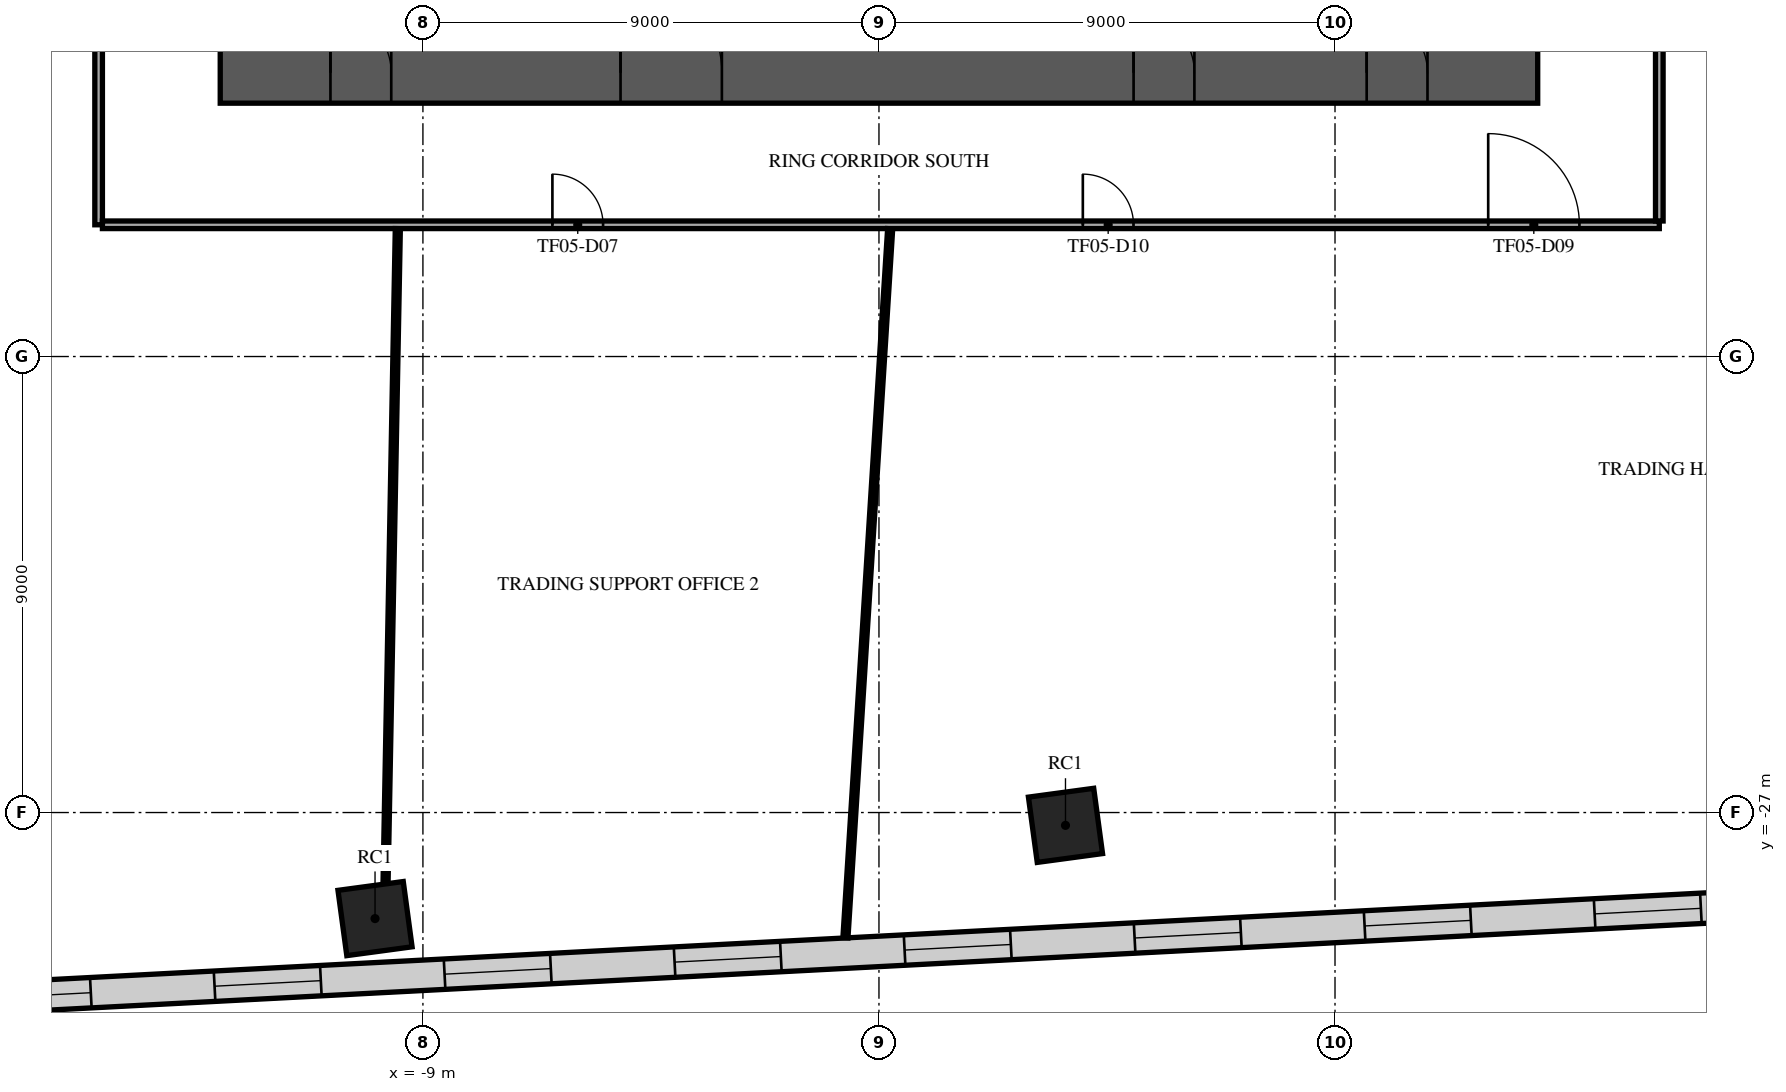
"""IFC4 building model, lengths in metres.
Left out: names, types, materials, properties, quantities, classifications, styles, units other than length and angle.
Written with IfcOpenShell. Run it as: python <this file> out.ifc"""

import sys

from ifc_helpers import new_model, si_unit, direction, frame, frame_2d, origin, origin_2d, place, context, subcontext, project, spatial, rectangle, extrude, element, fill, save


model = new_model("IFC4")
c1 = context("Model", 3, precision=1e-05, world=origin(), true_north=direction((0.0, 1.0)))
c2 = subcontext(c1, "Body", "Model", "MODEL_VIEW")
j1 = project(units=[si_unit("LENGTHUNIT", "METRE"), si_unit("PLANEANGLEUNIT", "RADIAN")], contexts=[c1])
p1 = place(None, origin())
s1 = spatial("IfcSite", under=j1, at=p1, CompositionType="ELEMENT")
p2 = place(p1, origin())
s2 = spatial("IfcBuilding", under=s1, at=p2, CompositionType="ELEMENT")
p3 = place(p2, frame((0.0, 0.0, 27.3)))
s3 = spatial("IfcBuildingStorey", under=s2, at=p3, CompositionType="ELEMENT", Elevation=27.3)
for number, where, z_axis, x_axis in (
    (1, (-9.945, -29.093, 0.0), (0.0, 0.0, 1.0), (0.991, 0.134, 0.0)),
    (2, (3.681, -27.253, 0.0), (0.0, 0.0, 1.0), (0.991, 0.134, 0.0)),
):
    element("IfcColumn", number, at=place(p3, frame(where, z_axis=z_axis, x_axis=x_axis)), inside=s3, PredefinedType="COLUMN", context=c2, shape_type="SweptSolid", body=[
        extrude(rectangle(XDim=1.3, YDim=1.3, at=origin_2d()), origin(), (0.0, 0.0, 1.0), 4.8),
    ])
p4 = place(p3, frame((-13.0, -12.4, 0.0), z_axis=(0.0, 0.0, 1.0), x_axis=(1.0, 0.0, 0.0)))
e3 = element("IfcWall", 3, at=p4, inside=s3, PredefinedType="SHEAR", context=c2, shape_type="SweptSolid", body=[
    extrude(rectangle(XDim=26.0, YDim=1.2, at=frame_2d((13.0, 0.0))), origin(), (0.0, 0.0, 1.0), 4.35),
])
p5 = place(p4, frame((7.9, 0.0, 0.0)))
e4 = element("IfcOpeningElement", 4, at=p5, cuts=e3, PredefinedType="OPENING", context=c2, shape_type="SweptSolid", body=[
    extrude(rectangle(XDim=2.0, YDim=2.1, at=frame_2d((1.0, 1.05))), frame((0.0, 0.61, 0.0), z_axis=(0.0, -1.0, 0.0), x_axis=(1.0, 0.0, 0.0)), (0.0, 0.0, 1.0), 1.22),
])
p6 = place(p4, frame((18.025, 0.0, 0.0)))
e5 = element("IfcOpeningElement", 5, at=p6, cuts=e3, PredefinedType="OPENING", context=c2, shape_type="SweptSolid", body=[
    extrude(rectangle(XDim=1.2, YDim=2.1, at=frame_2d((0.6, 1.05))), frame((0.0, 0.61, 0.0), z_axis=(0.0, -1.0, 0.0), x_axis=(1.0, 0.0, 0.0)), (0.0, 0.0, 1.0), 1.22),
])
p7 = place(p4, frame((2.175, 0.0, 0.0)))
e6 = element("IfcOpeningElement", 6, at=p7, cuts=e3, PredefinedType="OPENING", context=c2, shape_type="SweptSolid", body=[
    extrude(rectangle(XDim=1.2, YDim=2.1, at=frame_2d((0.6, 1.05))), frame((0.0, 0.61, 0.0), z_axis=(0.0, -1.0, 0.0), x_axis=(1.0, 0.0, 0.0)), (0.0, 0.0, 1.0), 1.22),
])
p8 = place(p4, frame((22.625, 0.0, 0.0)))
e7 = element("IfcOpeningElement", 7, at=p8, cuts=e3, PredefinedType="OPENING", context=c2, shape_type="SweptSolid", body=[
    extrude(rectangle(XDim=1.2, YDim=2.1, at=frame_2d((0.6, 1.05))), frame((0.0, 0.61, 0.0), z_axis=(0.0, -1.0, 0.0), x_axis=(1.0, 0.0, 0.0)), (0.0, 0.0, 1.0), 1.22),
])
p9 = place(p3, frame((-23.287, -30.961, 0.0), z_axis=(0.0, 0.0, 1.0), x_axis=(0.998629570739, 0.052335269612, 0.0)))
e8 = element("IfcWall", 8, at=p9, inside=s3, PredefinedType="STANDARD", context=c2, shape_type="SweptSolid", body=[
    extrude(rectangle(XDim=49.751, YDim=0.6, at=frame_2d((24.876, 0.0))), origin(), (0.0, 0.0, 1.0), 4.35),
])
p10 = place(p9, frame((1.161, 0.0, 0.9)))
e9 = element("IfcOpeningElement", 9, at=p10, cuts=e8, PredefinedType="OPENING", context=c2, shape_type="SweptSolid", body=[
    extrude(rectangle(XDim=2.1, YDim=2.7, at=frame_2d((1.05, 1.35))), frame((0.0, 0.31, 0.0), z_axis=(0.0, -1.0, 0.0), x_axis=(1.0, 0.0, 0.0)), (0.0, 0.0, 1.0), 0.62),
])
p11 = place(p9, frame((5.644, 0.0, 0.9)))
e10 = element("IfcOpeningElement", 10, at=p11, cuts=e8, PredefinedType="OPENING", context=c2, shape_type="SweptSolid", body=[
    extrude(rectangle(XDim=2.1, YDim=2.7, at=frame_2d((1.05, 1.35))), frame((0.0, 0.31, 0.0), z_axis=(0.0, -1.0, 0.0), x_axis=(1.0, 0.0, 0.0)), (0.0, 0.0, 1.0), 0.62),
])
p12 = place(p9, frame((10.189, 0.0, 0.9)))
e11 = element("IfcOpeningElement", 11, at=p12, cuts=e8, PredefinedType="OPENING", context=c2, shape_type="SweptSolid", body=[
    extrude(rectangle(XDim=2.1, YDim=2.7, at=frame_2d((1.05, 1.35))), frame((0.0, 0.31, 0.0), z_axis=(0.0, -1.0, 0.0), x_axis=(1.0, 0.0, 0.0)), (0.0, 0.0, 1.0), 0.62),
])
p13 = place(p9, frame((14.735, 0.0, 0.9)))
e12 = element("IfcOpeningElement", 12, at=p13, cuts=e8, PredefinedType="OPENING", context=c2, shape_type="SweptSolid", body=[
    extrude(rectangle(XDim=2.1, YDim=2.7, at=frame_2d((1.05, 1.35))), frame((0.0, 0.31, 0.0), z_axis=(0.0, -1.0, 0.0), x_axis=(1.0, 0.0, 0.0)), (0.0, 0.0, 1.0), 0.62),
])
p14 = place(p9, frame((19.28, 0.0, 0.9)))
e13 = element("IfcOpeningElement", 13, at=p14, cuts=e8, PredefinedType="OPENING", context=c2, shape_type="SweptSolid", body=[
    extrude(rectangle(XDim=2.1, YDim=2.7, at=frame_2d((1.05, 1.35))), frame((0.0, 0.31, 0.0), z_axis=(0.0, -1.0, 0.0), x_axis=(1.0, 0.0, 0.0)), (0.0, 0.0, 1.0), 0.62),
])
p15 = place(p9, frame((23.826, 0.0, 0.9)))
e14 = element("IfcOpeningElement", 14, at=p15, cuts=e8, PredefinedType="OPENING", context=c2, shape_type="SweptSolid", body=[
    extrude(rectangle(XDim=2.1, YDim=2.7, at=frame_2d((1.05, 1.35))), frame((0.0, 0.31, 0.0), z_axis=(0.0, -1.0, 0.0), x_axis=(1.0, 0.0, 0.0)), (0.0, 0.0, 1.0), 0.62),
])
p16 = place(p9, frame((28.371, 0.0, 0.9)))
e15 = element("IfcOpeningElement", 15, at=p16, cuts=e8, PredefinedType="OPENING", context=c2, shape_type="SweptSolid", body=[
    extrude(rectangle(XDim=2.1, YDim=2.7, at=frame_2d((1.05, 1.35))), frame((0.0, 0.31, 0.0), z_axis=(0.0, -1.0, 0.0), x_axis=(1.0, 0.0, 0.0)), (0.0, 0.0, 1.0), 0.62),
])
p17 = place(p9, frame((32.917, 0.0, 0.9)))
e16 = element("IfcOpeningElement", 16, at=p17, cuts=e8, PredefinedType="OPENING", context=c2, shape_type="SweptSolid", body=[
    extrude(rectangle(XDim=2.1, YDim=2.7, at=frame_2d((1.05, 1.35))), frame((0.0, 0.31, 0.0), z_axis=(0.0, -1.0, 0.0), x_axis=(1.0, 0.0, 0.0)), (0.0, 0.0, 1.0), 0.62),
])
p18 = place(p9, frame((37.462, 0.0, 0.9)))
e17 = element("IfcOpeningElement", 17, at=p18, cuts=e8, PredefinedType="OPENING", context=c2, shape_type="SweptSolid", body=[
    extrude(rectangle(XDim=2.1, YDim=2.7, at=frame_2d((1.05, 1.35))), frame((0.0, 0.31, 0.0), z_axis=(0.0, -1.0, 0.0), x_axis=(1.0, 0.0, 0.0)), (0.0, 0.0, 1.0), 0.62),
])
p19 = place(p9, frame((42.008, 0.0, 0.9)))
e18 = element("IfcOpeningElement", 18, at=p19, cuts=e8, PredefinedType="OPENING", context=c2, shape_type="SweptSolid", body=[
    extrude(rectangle(XDim=2.1, YDim=2.7, at=frame_2d((1.05, 1.35))), frame((0.0, 0.31, 0.0), z_axis=(0.0, -1.0, 0.0), x_axis=(1.0, 0.0, 0.0)), (0.0, 0.0, 1.0), 0.62),
])
p20 = place(p9, frame((46.491, 0.0, 0.9)))
e19 = element("IfcOpeningElement", 19, at=p20, cuts=e8, PredefinedType="OPENING", context=c2, shape_type="SweptSolid", body=[
    extrude(rectangle(XDim=2.1, YDim=2.7, at=frame_2d((1.05, 1.35))), frame((0.0, 0.31, 0.0), z_axis=(0.0, -1.0, 0.0), x_axis=(1.0, 0.0, 0.0)), (0.0, 0.0, 1.0), 0.62),
])
p21 = place(p3, frame((-15.4, -15.4, 0.0), z_axis=(0.0, 0.0, 1.0), x_axis=(0.0, 1.0, 0.0)))
e20 = element("IfcWall", 20, at=p21, inside=s3, PredefinedType="PARTITIONING", context=c2, shape_type="SweptSolid", body=[
    extrude(rectangle(XDim=30.8, YDim=0.15, at=frame_2d((15.4, 0.0))), origin(), (0.0, 0.0, 1.0), 3.85),
])
p22 = place(p21, frame((17.342, 0.0, 0.0)))
e21 = element("IfcOpeningElement", 21, at=p22, cuts=e20, PredefinedType="OPENING", context=c2, shape_type="SweptSolid", body=[
    extrude(rectangle(XDim=1.8, YDim=2.1, at=frame_2d((0.9, 1.05))), frame((0.0, 0.085, 0.0), z_axis=(0.0, -1.0, 0.0), x_axis=(1.0, 0.0, 0.0)), (0.0, 0.0, 1.0), 0.17),
])
p23 = place(p21, frame((21.842, 0.0, 0.0)))
e22 = element("IfcOpeningElement", 22, at=p23, cuts=e20, PredefinedType="OPENING", context=c2, shape_type="SweptSolid", body=[
    extrude(rectangle(XDim=1.0, YDim=2.1, at=frame_2d((0.5, 1.05))), frame((0.0, 0.085, 0.0), z_axis=(0.0, -1.0, 0.0), x_axis=(1.0, 0.0, 0.0)), (0.0, 0.0, 1.0), 0.17),
])
p24 = place(p21, frame((4.05, 0.0, 0.0)))
e23 = element("IfcOpeningElement", 23, at=p24, cuts=e20, PredefinedType="OPENING", context=c2, shape_type="SweptSolid", body=[
    extrude(rectangle(XDim=1.8, YDim=2.1, at=frame_2d((0.9, 1.05))), frame((0.0, 0.085, 0.0), z_axis=(0.0, -1.0, 0.0), x_axis=(1.0, 0.0, 0.0)), (0.0, 0.0, 1.0), 0.17),
])
p25 = place(p21, frame((10.05, 0.0, 0.0)))
e24 = element("IfcOpeningElement", 24, at=p25, cuts=e20, PredefinedType="OPENING", context=c2, shape_type="SweptSolid", body=[
    extrude(rectangle(XDim=1.0, YDim=2.1, at=frame_2d((0.5, 1.05))), frame((0.0, 0.085, 0.0), z_axis=(0.0, -1.0, 0.0), x_axis=(1.0, 0.0, 0.0)), (0.0, 0.0, 1.0), 0.17),
])
p26 = place(p21, frame((24.266, 0.0, 0.0)))
e25 = element("IfcOpeningElement", 25, at=p26, cuts=e20, PredefinedType="OPENING", context=c2, shape_type="SweptSolid", body=[
    extrude(rectangle(XDim=1.0, YDim=2.1, at=frame_2d((0.5, 1.05))), frame((0.0, 0.085, 0.0), z_axis=(0.0, -1.0, 0.0), x_axis=(1.0, 0.0, 0.0)), (0.0, 0.0, 1.0), 0.17),
])
p27 = place(p3, frame((-15.325, -15.4, 0.0), z_axis=(0.0, 0.0, 1.0), x_axis=(1.0, 0.0, 0.0)))
e26 = element("IfcWall", 26, at=p27, inside=s3, PredefinedType="PARTITIONING", context=c2, shape_type="SweptSolid", body=[
    extrude(rectangle(XDim=30.725, YDim=0.15, at=frame_2d((15.362, 0.0))), origin(), (0.0, 0.0, 1.0), 3.85),
])
p28 = place(p27, frame((8.88, 0.0, 0.0)))
e27 = element("IfcOpeningElement", 27, at=p28, cuts=e26, PredefinedType="OPENING", context=c2, shape_type="SweptSolid", body=[
    extrude(rectangle(XDim=1.0, YDim=2.1, at=frame_2d((0.5, 1.05))), frame((0.0, 0.085, 0.0), z_axis=(0.0, -1.0, 0.0), x_axis=(1.0, 0.0, 0.0)), (0.0, 0.0, 1.0), 0.17),
])
p29 = place(p27, frame((27.348, 0.0, 0.0)))
e28 = element("IfcOpeningElement", 28, at=p29, cuts=e26, PredefinedType="OPENING", context=c2, shape_type="SweptSolid", body=[
    extrude(rectangle(XDim=1.8, YDim=2.1, at=frame_2d((0.9, 1.05))), frame((0.0, 0.085, 0.0), z_axis=(0.0, -1.0, 0.0), x_axis=(1.0, 0.0, 0.0)), (0.0, 0.0, 1.0), 0.17),
])
p30 = place(p27, frame((19.348, 0.0, 0.0)))
e29 = element("IfcOpeningElement", 29, at=p30, cuts=e26, PredefinedType="OPENING", context=c2, shape_type="SweptSolid", body=[
    extrude(rectangle(XDim=1.0, YDim=2.1, at=frame_2d((0.5, 1.05))), frame((0.0, 0.085, 0.0), z_axis=(0.0, -1.0, 0.0), x_axis=(1.0, 0.0, 0.0)), (0.0, 0.0, 1.0), 0.17),
])
p31 = place(p3, frame((15.4, -15.325, 0.0), z_axis=(0.0, 0.0, 1.0), x_axis=(0.0, 1.0, 0.0)))
e30 = element("IfcWall", 30, at=p31, inside=s3, PredefinedType="PARTITIONING", context=c2, shape_type="SweptSolid", body=[
    extrude(rectangle(XDim=30.65, YDim=0.15, at=frame_2d((15.325, 0.0))), origin(), (0.0, 0.0, 1.0), 3.85),
])
p32 = place(p31, frame((25.068, 0.0, 0.0)))
e31 = element("IfcOpeningElement", 31, at=p32, cuts=e30, PredefinedType="OPENING", context=c2, shape_type="SweptSolid", body=[
    extrude(rectangle(XDim=1.8, YDim=2.1, at=frame_2d((0.9, 1.05))), frame((0.0, 0.085, 0.0), z_axis=(0.0, -1.0, 0.0), x_axis=(1.0, 0.0, 0.0)), (0.0, 0.0, 1.0), 0.17),
])
p33 = place(p31, frame((10.927, 0.0, 0.0)))
e32 = element("IfcOpeningElement", 32, at=p33, cuts=e30, PredefinedType="OPENING", context=c2, shape_type="SweptSolid", body=[
    extrude(rectangle(XDim=1.0, YDim=2.1, at=frame_2d((0.5, 1.05))), frame((0.0, 0.085, 0.0), z_axis=(0.0, -1.0, 0.0), x_axis=(1.0, 0.0, 0.0)), (0.0, 0.0, 1.0), 0.17),
])
p34 = place(p3, frame((-9.738, -28.409, 0.0), z_axis=(0.0, 0.0, 1.0), x_axis=(0.01874139866, 0.999824364564, 0.0)))
e33 = element("IfcWall", 33, at=p34, inside=s3, PredefinedType="PARTITIONING", context=c2, shape_type="SweptSolid", body=[
    extrude(rectangle(XDim=12.936, YDim=0.1, at=frame_2d((6.468, 0.0))), origin(), (0.0, 0.0, 1.0), 3.85),
])
p35 = place(p3, frame((-0.662, -29.473, 0.0), z_axis=(0.0, 0.0, 1.0), x_axis=(0.06297334424, 0.99801520926, 0.0)))
e34 = element("IfcWall", 34, at=p35, inside=s3, PredefinedType="PARTITIONING", context=c2, shape_type="SweptSolid", body=[
    extrude(rectangle(XDim=14.023, YDim=0.1, at=frame_2d((7.011, 0.0))), origin(), (0.0, 0.0, 1.0), 3.55),
])
p36 = place(p5, origin())
e35 = element("IfcDoor", 35, at=p36, inside=s3, OperationType="SINGLE_SWING_LEFT", PredefinedType="DOOR", context=c2, shape_type="SweptSolid", body=[
    extrude(rectangle(XDim=2.0, YDim=2.1, at=frame_2d((1.0, 1.05))), frame((0.0, 0.025, 0.0), z_axis=(0.0, -1.0, 0.0), x_axis=(1.0, 0.0, 0.0)), (0.0, 0.0, 1.0), 0.05),
])
fill(e4, e35)
p37 = place(p6, origin())
e36 = element("IfcDoor", 36, at=p37, inside=s3, OperationType="SINGLE_SWING_LEFT", PredefinedType="DOOR", context=c2, shape_type="SweptSolid", body=[
    extrude(rectangle(XDim=1.2, YDim=2.1, at=frame_2d((0.6, 1.05))), frame((0.0, 0.025, 0.0), z_axis=(0.0, -1.0, 0.0), x_axis=(1.0, 0.0, 0.0)), (0.0, 0.0, 1.0), 0.05),
])
fill(e5, e36)
p38 = place(p7, origin())
e37 = element("IfcDoor", 37, at=p38, inside=s3, OperationType="SINGLE_SWING_LEFT", PredefinedType="DOOR", context=c2, shape_type="SweptSolid", body=[
    extrude(rectangle(XDim=1.2, YDim=2.1, at=frame_2d((0.6, 1.05))), frame((0.0, 0.025, 0.0), z_axis=(0.0, -1.0, 0.0), x_axis=(1.0, 0.0, 0.0)), (0.0, 0.0, 1.0), 0.05),
])
fill(e6, e37)
p39 = place(p8, origin())
e38 = element("IfcDoor", 38, at=p39, inside=s3, OperationType="SINGLE_SWING_LEFT", PredefinedType="DOOR", context=c2, shape_type="SweptSolid", body=[
    extrude(rectangle(XDim=1.2, YDim=2.1, at=frame_2d((0.6, 1.05))), frame((0.0, 0.025, 0.0), z_axis=(0.0, -1.0, 0.0), x_axis=(1.0, 0.0, 0.0)), (0.0, 0.0, 1.0), 0.05),
])
fill(e7, e38)
p40 = place(p11, origin())
e39 = element("IfcWindow", 39, at=p40, inside=s3, PartitioningType="SINGLE_PANEL", PredefinedType="WINDOW", context=c2, shape_type="SweptSolid", body=[
    extrude(rectangle(XDim=2.1, YDim=2.7, at=frame_2d((1.05, 1.35))), frame((0.0, 0.03, 0.0), z_axis=(0.0, -1.0, 0.0), x_axis=(1.0, 0.0, 0.0)), (0.0, 0.0, 1.0), 0.06),
])
fill(e10, e39)
p41 = place(p12, origin())
e40 = element("IfcWindow", 40, at=p41, inside=s3, PartitioningType="SINGLE_PANEL", PredefinedType="WINDOW", context=c2, shape_type="SweptSolid", body=[
    extrude(rectangle(XDim=2.1, YDim=2.7, at=frame_2d((1.05, 1.35))), frame((0.0, 0.03, 0.0), z_axis=(0.0, -1.0, 0.0), x_axis=(1.0, 0.0, 0.0)), (0.0, 0.0, 1.0), 0.06),
])
fill(e11, e40)
p42 = place(p13, origin())
e41 = element("IfcWindow", 41, at=p42, inside=s3, PartitioningType="SINGLE_PANEL", PredefinedType="WINDOW", context=c2, shape_type="SweptSolid", body=[
    extrude(rectangle(XDim=2.1, YDim=2.7, at=frame_2d((1.05, 1.35))), frame((0.0, 0.03, 0.0), z_axis=(0.0, -1.0, 0.0), x_axis=(1.0, 0.0, 0.0)), (0.0, 0.0, 1.0), 0.06),
])
fill(e12, e41)
p43 = place(p14, origin())
e42 = element("IfcWindow", 42, at=p43, inside=s3, PartitioningType="SINGLE_PANEL", PredefinedType="WINDOW", context=c2, shape_type="SweptSolid", body=[
    extrude(rectangle(XDim=2.1, YDim=2.7, at=frame_2d((1.05, 1.35))), frame((0.0, 0.03, 0.0), z_axis=(0.0, -1.0, 0.0), x_axis=(1.0, 0.0, 0.0)), (0.0, 0.0, 1.0), 0.06),
])
fill(e13, e42)
p44 = place(p15, origin())
e43 = element("IfcWindow", 43, at=p44, inside=s3, PartitioningType="SINGLE_PANEL", PredefinedType="WINDOW", context=c2, shape_type="SweptSolid", body=[
    extrude(rectangle(XDim=2.1, YDim=2.7, at=frame_2d((1.05, 1.35))), frame((0.0, 0.03, 0.0), z_axis=(0.0, -1.0, 0.0), x_axis=(1.0, 0.0, 0.0)), (0.0, 0.0, 1.0), 0.06),
])
fill(e14, e43)
p45 = place(p16, origin())
e44 = element("IfcWindow", 44, at=p45, inside=s3, PartitioningType="SINGLE_PANEL", PredefinedType="WINDOW", context=c2, shape_type="SweptSolid", body=[
    extrude(rectangle(XDim=2.1, YDim=2.7, at=frame_2d((1.05, 1.35))), frame((0.0, 0.03, 0.0), z_axis=(0.0, -1.0, 0.0), x_axis=(1.0, 0.0, 0.0)), (0.0, 0.0, 1.0), 0.06),
])
fill(e15, e44)
p46 = place(p17, origin())
e45 = element("IfcWindow", 45, at=p46, inside=s3, PartitioningType="SINGLE_PANEL", PredefinedType="WINDOW", context=c2, shape_type="SweptSolid", body=[
    extrude(rectangle(XDim=2.1, YDim=2.7, at=frame_2d((1.05, 1.35))), frame((0.0, 0.03, 0.0), z_axis=(0.0, -1.0, 0.0), x_axis=(1.0, 0.0, 0.0)), (0.0, 0.0, 1.0), 0.06),
])
fill(e16, e45)
p47 = place(p18, origin())
e46 = element("IfcWindow", 46, at=p47, inside=s3, PartitioningType="SINGLE_PANEL", PredefinedType="WINDOW", context=c2, shape_type="SweptSolid", body=[
    extrude(rectangle(XDim=2.1, YDim=2.7, at=frame_2d((1.05, 1.35))), frame((0.0, 0.03, 0.0), z_axis=(0.0, -1.0, 0.0), x_axis=(1.0, 0.0, 0.0)), (0.0, 0.0, 1.0), 0.06),
])
fill(e17, e46)
p48 = place(p28, frame((1.0, 0.0, 0.0), z_axis=(0.0, 0.0, 1.0), x_axis=(-1.0, 0.0, 0.0)))
e47 = element("IfcDoor", 47, at=p48, inside=s3, OperationType="SINGLE_SWING_LEFT", PredefinedType="DOOR", context=c2, shape_type="SweptSolid", body=[
    extrude(rectangle(XDim=1.0, YDim=2.1, at=frame_2d((0.5, 1.05))), frame((0.0, 0.025, 0.0), z_axis=(0.0, -1.0, 0.0), x_axis=(1.0, 0.0, 0.0)), (0.0, 0.0, 1.0), 0.05),
])
fill(e27, e47)
p49 = place(p29, frame((1.8, 0.0, 0.0), z_axis=(0.0, 0.0, 1.0), x_axis=(-1.0, 0.0, 0.0)))
e48 = element("IfcDoor", 48, at=p49, inside=s3, OperationType="DOUBLE_DOOR_SINGLE_SWING", PredefinedType="DOOR", context=c2, shape_type="SweptSolid", body=[
    extrude(rectangle(XDim=1.8, YDim=2.1, at=frame_2d((0.9, 1.05))), frame((0.0, 0.025, 0.0), z_axis=(0.0, -1.0, 0.0), x_axis=(1.0, 0.0, 0.0)), (0.0, 0.0, 1.0), 0.05),
])
fill(e28, e48)
p50 = place(p30, frame((1.0, 0.0, 0.0), z_axis=(0.0, 0.0, 1.0), x_axis=(-1.0, 0.0, 0.0)))
e49 = element("IfcDoor", 49, at=p50, inside=s3, OperationType="SINGLE_SWING_RIGHT", PredefinedType="DOOR", context=c2, shape_type="SweptSolid", body=[
    extrude(rectangle(XDim=1.0, YDim=2.1, at=frame_2d((0.5, 1.05))), frame((0.0, 0.025, 0.0), z_axis=(0.0, -1.0, 0.0), x_axis=(1.0, 0.0, 0.0)), (0.0, 0.0, 1.0), 0.05),
])
fill(e29, e49)
save(model, sys.argv[1])
